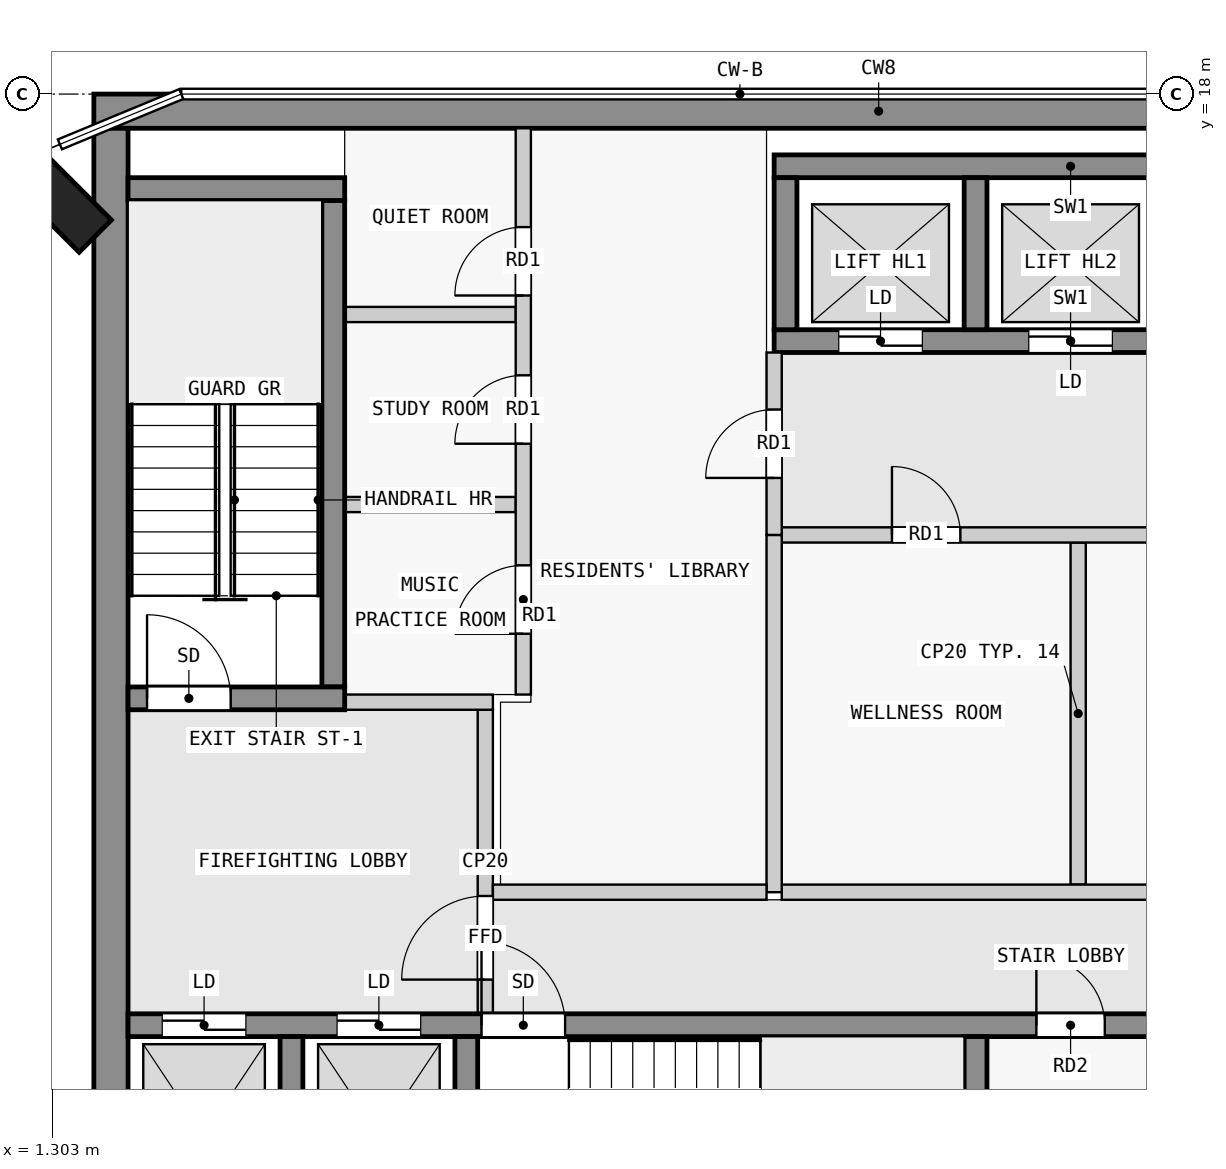
"""IFC4 building model, lengths in metres.
Left out: names, types, materials, properties, quantities, classifications, styles, units other than length and angle.
Written with IfcOpenShell. Run it as: python <this file> out.ifc"""

import sys

from ifc_helpers import new_model, si_unit, direction, frame, frame_2d, origin, origin_2d, place, context, subcontext, project, spatial, rectangle, extrude, element, fill, save


model = new_model("IFC4")
c1 = context("Model", 3, precision=1e-05, world=origin(), true_north=direction((0.0, 1.0)))
c2 = subcontext(c1, "Body", "Model", "MODEL_VIEW")
j1 = project(units=[si_unit("LENGTHUNIT", "METRE"), si_unit("PLANEANGLEUNIT", "RADIAN")], contexts=[c1])
p1 = place(None, origin())
s1 = spatial("IfcSite", under=j1, at=p1, CompositionType="ELEMENT")
p2 = place(p1, origin())
s2 = spatial("IfcBuilding", under=s1, at=p2, CompositionType="ELEMENT")
p3 = place(p2, frame((0.0, 0.0, 259.9)))
s3 = spatial("IfcBuildingStorey", under=s2, at=p3, CompositionType="ELEMENT", Elevation=259.9)
p4 = place(p3, frame((1.374, 16.626, 0.0), z_axis=(0.0, 0.0, 1.0), x_axis=(0.707106781187, 0.707106781187, 0.0)))
e1 = element("IfcColumn", 1, at=p4, inside=s3, PredefinedType="COLUMN", context=c2, shape_type="SweptSolid", body=[
    extrude(rectangle(XDim=0.6, YDim=1.4, at=origin_2d()), origin(), (0.0, 0.0, 1.0), 3.5),
])
p5 = place(p3, frame((1.85, 17.775, 0.0), z_axis=(0.0, 0.0, 1.0), x_axis=(1.0, 0.0, 0.0)))
e2 = element("IfcWall", 2, at=p5, inside=s3, PredefinedType="SHEAR", context=c2, shape_type="SweptSolid", body=[
    extrude(rectangle(XDim=20.65, YDim=0.45, at=frame_2d((10.325, 0.0))), origin(), (0.0, 0.0, 1.0), 3.25),
])
p6 = place(p3, frame((2.075, 2.5, 0.0), z_axis=(0.0, 0.0, 1.0), x_axis=(0.0, 1.0, 0.0)))
e3 = element("IfcWall", 3, at=p6, inside=s3, PredefinedType="SHEAR", context=c2, shape_type="SweptSolid", body=[
    extrude(rectangle(XDim=15.05, YDim=0.45, at=frame_2d((7.525, 0.0))), origin(), (0.0, 0.0, 1.0), 3.25),
])
for number, where, z_axis, x_axis in (
    (4, (4.45, 2.8, 0.0), (0.0, 0.0, 1.0), (0.0, 1.0, 0.0)),
    (5, (6.75, 2.8, 0.0), (0.0, 0.0, 1.0), (0.0, 1.0, 0.0)),
    (6, (13.45, 2.8, 0.0), (0.0, 0.0, 1.0), (0.0, 1.0, 0.0)),
):
    element("IfcWall", number, at=place(p3, frame(where, z_axis=z_axis, x_axis=x_axis)), inside=s3, PredefinedType="SHEAR", context=c2, shape_type="SweptSolid", body=[
        extrude(rectangle(XDim=2.8, YDim=0.3, at=frame_2d((1.4, 0.0))), origin(), (0.0, 0.0, 1.0), 3.25),
    ])
p7 = place(p3, frame((2.3, 5.75, 0.0), z_axis=(0.0, 0.0, 1.0), x_axis=(1.0, 0.0, 0.0)))
e7 = element("IfcWall", 7, at=p7, inside=s3, PredefinedType="SHEAR", context=c2, shape_type="SweptSolid", body=[
    extrude(rectangle(XDim=18.8, YDim=0.3, at=frame_2d((9.4, 0.0))), origin(), (0.0, 0.0, 1.0), 3.25),
])
p8 = place(p7, frame((4.65, 0.0, 0.0)))
e8 = element("IfcOpeningElement", 8, at=p8, cuts=e7, PredefinedType="OPENING", context=c2, shape_type="SweptSolid", body=[
    extrude(rectangle(XDim=1.1, YDim=2.1, at=frame_2d((0.55, 1.05))), frame((0.0, 0.16, 0.0), z_axis=(0.0, -1.0, 0.0), x_axis=(1.0, 0.0, 0.0)), (0.0, 0.0, 1.0), 0.32),
])
p9 = place(p7, frame((0.45, 0.0, 0.0)))
e9 = element("IfcOpeningElement", 9, at=p9, cuts=e7, PredefinedType="OPENING", context=c2, shape_type="SweptSolid", body=[
    extrude(rectangle(XDim=1.1, YDim=2.1, at=frame_2d((0.55, 1.05))), frame((0.0, 0.16, 0.0), z_axis=(0.0, -1.0, 0.0), x_axis=(1.0, 0.0, 0.0)), (0.0, 0.0, 1.0), 0.32),
])
p10 = place(p7, frame((2.75, 0.0, 0.0)))
e10 = element("IfcOpeningElement", 10, at=p10, cuts=e7, PredefinedType="OPENING", context=c2, shape_type="SweptSolid", body=[
    extrude(rectangle(XDim=1.1, YDim=2.1, at=frame_2d((0.55, 1.05))), frame((0.0, 0.16, 0.0), z_axis=(0.0, -1.0, 0.0), x_axis=(1.0, 0.0, 0.0)), (0.0, 0.0, 1.0), 0.32),
])
p11 = place(p7, frame((11.95, 0.0, 0.0)))
e11 = element("IfcOpeningElement", 11, at=p11, cuts=e7, PredefinedType="OPENING", context=c2, shape_type="SweptSolid", body=[
    extrude(rectangle(XDim=0.9, YDim=2.1, at=frame_2d((0.45, 1.05))), frame((0.0, 0.16, 0.0), z_axis=(0.0, -1.0, 0.0), x_axis=(1.0, 0.0, 0.0)), (0.0, 0.0, 1.0), 0.32),
])
p12 = place(p7, frame((15.7, 0.0, 0.0)))
e12 = element("IfcOpeningElement", 12, at=p12, cuts=e7, PredefinedType="OPENING", context=c2, shape_type="SweptSolid", body=[
    extrude(rectangle(XDim=0.9, YDim=2.1, at=frame_2d((0.45, 1.05))), frame((0.0, 0.16, 0.0), z_axis=(0.0, -1.0, 0.0), x_axis=(1.0, 0.0, 0.0)), (0.0, 0.0, 1.0), 0.32),
])
p13 = place(p3, frame((2.3, 10.05, 0.0), z_axis=(0.0, 0.0, 1.0), x_axis=(1.0, 0.0, 0.0)))
e13 = element("IfcWall", 13, at=p13, inside=s3, PredefinedType="SHEAR", context=c2, shape_type="SweptSolid", body=[
    extrude(rectangle(XDim=2.85, YDim=0.3, at=frame_2d((1.425, 0.0))), origin(), (0.0, 0.0, 1.0), 3.25),
])
p14 = place(p13, frame((0.25, 0.0, 0.0)))
e14 = element("IfcOpeningElement", 14, at=p14, cuts=e13, PredefinedType="OPENING", context=c2, shape_type="SweptSolid", body=[
    extrude(rectangle(XDim=1.1, YDim=2.1, at=frame_2d((0.55, 1.05))), frame((0.0, 0.16, 0.0), z_axis=(0.0, -1.0, 0.0), x_axis=(1.0, 0.0, 0.0)), (0.0, 0.0, 1.0), 0.32),
])
p15 = place(p3, frame((5.0, 10.2, 0.0), z_axis=(0.0, 0.0, 1.0), x_axis=(0.0, 1.0, 0.0)))
e15 = element("IfcWall", 15, at=p15, inside=s3, PredefinedType="SHEAR", context=c2, shape_type="SweptSolid", body=[
    extrude(rectangle(XDim=6.4, YDim=0.3, at=frame_2d((3.2, 0.0))), origin(), (0.0, 0.0, 1.0), 3.25),
])
p16 = place(p3, frame((2.3, 16.75, 0.0), z_axis=(0.0, 0.0, 1.0), x_axis=(1.0, 0.0, 0.0)))
e16 = element("IfcWall", 16, at=p16, inside=s3, PredefinedType="SHEAR", context=c2, shape_type="SweptSolid", body=[
    extrude(rectangle(XDim=2.85, YDim=0.3, at=frame_2d((1.425, 0.0))), origin(), (0.0, 0.0, 1.0), 3.25),
])
p17 = place(p3, frame((10.8, 17.05, 0.0), z_axis=(0.0, 0.0, 1.0), x_axis=(1.0, 0.0, 0.0)))
e17 = element("IfcWall", 17, at=p17, inside=s3, PredefinedType="SHEAR", context=c2, shape_type="SweptSolid", body=[
    extrude(rectangle(XDim=7.8, YDim=0.3, at=frame_2d((3.9, 0.0))), origin(), (0.0, 0.0, 1.0), 3.25),
])
p18 = place(p3, frame((10.8, 14.75, 0.0), z_axis=(0.0, 0.0, 1.0), x_axis=(1.0, 0.0, 0.0)))
e18 = element("IfcWall", 18, at=p18, inside=s3, PredefinedType="SHEAR", context=c2, shape_type="SweptSolid", body=[
    extrude(rectangle(XDim=7.8, YDim=0.3, at=frame_2d((3.9, 0.0))), origin(), (0.0, 0.0, 1.0), 3.25),
])
p19 = place(p18, frame((0.85, 0.0, 0.0)))
e19 = element("IfcOpeningElement", 19, at=p19, cuts=e18, PredefinedType="OPENING", context=c2, shape_type="SweptSolid", body=[
    extrude(rectangle(XDim=1.1, YDim=2.1, at=frame_2d((0.55, 1.05))), frame((0.0, 0.16, 0.0), z_axis=(0.0, -1.0, 0.0), x_axis=(1.0, 0.0, 0.0)), (0.0, 0.0, 1.0), 0.32),
])
p20 = place(p18, frame((3.35, 0.0, 0.0)))
e20 = element("IfcOpeningElement", 20, at=p20, cuts=e18, PredefinedType="OPENING", context=c2, shape_type="SweptSolid", body=[
    extrude(rectangle(XDim=1.1, YDim=2.1, at=frame_2d((0.55, 1.05))), frame((0.0, 0.16, 0.0), z_axis=(0.0, -1.0, 0.0), x_axis=(1.0, 0.0, 0.0)), (0.0, 0.0, 1.0), 0.32),
])
p21 = place(p18, frame((5.85, 0.0, 0.0)))
e21 = element("IfcOpeningElement", 21, at=p21, cuts=e18, PredefinedType="OPENING", context=c2, shape_type="SweptSolid", body=[
    extrude(rectangle(XDim=1.1, YDim=2.1, at=frame_2d((0.55, 1.05))), frame((0.0, 0.16, 0.0), z_axis=(0.0, -1.0, 0.0), x_axis=(1.0, 0.0, 0.0)), (0.0, 0.0, 1.0), 0.32),
])
for number, where, z_axis, x_axis in (
    (22, (10.95, 14.9, 0.0), (0.0, 0.0, 1.0), (0.0, 1.0, 0.0)),
    (23, (13.45, 14.9, 0.0), (0.0, 0.0, 1.0), (0.0, 1.0, 0.0)),
):
    element("IfcWall", number, at=place(p3, frame(where, z_axis=z_axis, x_axis=x_axis)), inside=s3, PredefinedType="SHEAR", context=c2, shape_type="SweptSolid", body=[
        extrude(rectangle(XDim=2.0, YDim=0.3, at=frame_2d((1.0, 0.0))), origin(), (0.0, 0.0, 1.0), 3.25),
    ])
p22 = place(p3, frame((7.0, 5.9, 0.0), z_axis=(0.0, 0.0, 1.0), x_axis=(0.0, 1.0, 0.0)))
e24 = element("IfcWall", 24, at=p22, inside=s3, PredefinedType="PARTITIONING", context=c2, shape_type="SweptSolid", body=[
    extrude(rectangle(XDim=4.0, YDim=0.2, at=frame_2d((2.0, 0.0))), origin(), (0.0, 0.0, 1.0), 3.25),
])
p23 = place(p22, frame((0.45, 0.0, 0.0)))
e25 = element("IfcOpeningElement", 25, at=p23, cuts=e24, PredefinedType="OPENING", context=c2, shape_type="SweptSolid", body=[
    extrude(rectangle(XDim=1.1, YDim=2.1, at=frame_2d((0.55, 1.05))), frame((0.0, 0.11, 0.0), z_axis=(0.0, -1.0, 0.0), x_axis=(1.0, 0.0, 0.0)), (0.0, 0.0, 1.0), 0.22),
])
p24 = place(p3, frame((5.15, 10.0, 0.0), z_axis=(0.0, 0.0, 1.0), x_axis=(1.0, 0.0, 0.0)))
e26 = element("IfcWall", 26, at=p24, inside=s3, PredefinedType="PARTITIONING", context=c2, shape_type="SweptSolid", body=[
    extrude(rectangle(XDim=1.95, YDim=0.2, at=frame_2d((0.975, 0.0))), origin(), (0.0, 0.0, 1.0), 3.25),
])
p25 = place(p3, frame((7.1, 7.5, 0.0), z_axis=(0.0, 0.0, 1.0), x_axis=(1.0, 0.0, 0.0)))
e27 = element("IfcWall", 27, at=p25, inside=s3, PredefinedType="PARTITIONING", context=c2, shape_type="SweptSolid", body=[
    extrude(rectangle(XDim=3.6, YDim=0.2, at=frame_2d((1.8, 0.0))), origin(), (0.0, 0.0, 1.0), 3.25),
])
p26 = place(p3, frame((10.8, 12.2, 0.0), z_axis=(0.0, 0.0, 1.0), x_axis=(0.0, 1.0, 0.0)))
e28 = element("IfcWall", 28, at=p26, inside=s3, PredefinedType="PARTITIONING", context=c2, shape_type="SweptSolid", body=[
    extrude(rectangle(XDim=2.4, YDim=0.2, at=frame_2d((1.2, 0.0))), origin(), (0.0, 0.0, 1.0), 3.25),
])
p27 = place(p26, frame((0.75, 0.0, 0.0)))
e29 = element("IfcOpeningElement", 29, at=p27, cuts=e28, PredefinedType="OPENING", context=c2, shape_type="SweptSolid", body=[
    extrude(rectangle(XDim=0.9, YDim=2.1, at=frame_2d((0.45, 1.05))), frame((0.0, 0.11, 0.0), z_axis=(0.0, -1.0, 0.0), x_axis=(1.0, 0.0, 0.0)), (0.0, 0.0, 1.0), 0.22),
])
p28 = place(p3, frame((10.8, 7.5, 0.0), z_axis=(0.0, 0.0, 1.0), x_axis=(0.0, 1.0, 0.0)))
e30 = element("IfcWall", 30, at=p28, inside=s3, PredefinedType="PARTITIONING", context=c2, shape_type="SweptSolid", body=[
    extrude(rectangle(XDim=4.7, YDim=0.2, at=frame_2d((2.35, 0.0))), origin(), (0.0, 0.0, 1.0), 3.25),
])
p29 = place(p3, frame((10.9, 7.5, 0.0), z_axis=(0.0, 0.0, 1.0), x_axis=(1.0, 0.0, 0.0)))
e31 = element("IfcWall", 31, at=p29, inside=s3, PredefinedType="PARTITIONING", context=c2, shape_type="SweptSolid", body=[
    extrude(rectangle(XDim=8.65, YDim=0.2, at=frame_2d((4.325, 0.0))), origin(), (0.0, 0.0, 1.0), 3.25),
])
p30 = place(p3, frame((10.9, 12.2, 0.0), z_axis=(0.0, 0.0, 1.0), x_axis=(1.0, 0.0, 0.0)))
e32 = element("IfcWall", 32, at=p30, inside=s3, PredefinedType="PARTITIONING", context=c2, shape_type="SweptSolid", body=[
    extrude(rectangle(XDim=8.65, YDim=0.2, at=frame_2d((4.325, 0.0))), origin(), (0.0, 0.0, 1.0), 3.25),
])
p31 = place(p30, frame((1.45, 0.0, 0.0)))
e33 = element("IfcOpeningElement", 33, at=p31, cuts=e32, PredefinedType="OPENING", context=c2, shape_type="SweptSolid", body=[
    extrude(rectangle(XDim=0.9, YDim=2.1, at=frame_2d((0.45, 1.05))), frame((0.0, 0.11, 0.0), z_axis=(0.0, -1.0, 0.0), x_axis=(1.0, 0.0, 0.0)), (0.0, 0.0, 1.0), 0.22),
])
p32 = place(p30, frame((5.875, 0.0, 0.0)))
e34 = element("IfcOpeningElement", 34, at=p32, cuts=e32, PredefinedType="OPENING", context=c2, shape_type="SweptSolid", body=[
    extrude(rectangle(XDim=0.9, YDim=2.1, at=frame_2d((0.45, 1.05))), frame((0.0, 0.11, 0.0), z_axis=(0.0, -1.0, 0.0), x_axis=(1.0, 0.0, 0.0)), (0.0, 0.0, 1.0), 0.22),
])
p33 = place(p3, frame((14.8, 7.6, 0.0), z_axis=(0.0, 0.0, 1.0), x_axis=(0.0, 1.0, 0.0)))
e35 = element("IfcWall", 35, at=p33, inside=s3, PredefinedType="PARTITIONING", context=c2, shape_type="SweptSolid", body=[
    extrude(rectangle(XDim=4.5, YDim=0.2, at=frame_2d((2.25, 0.0))), origin(), (0.0, 0.0, 1.0), 3.25),
])
p34 = place(p3, frame((7.5, 10.1, 0.0), z_axis=(0.0, 0.0, 1.0), x_axis=(0.0, 1.0, 0.0)))
e36 = element("IfcWall", 36, at=p34, inside=s3, PredefinedType="PARTITIONING", context=c2, shape_type="SweptSolid", body=[
    extrude(rectangle(XDim=7.45, YDim=0.2, at=frame_2d((3.725, 0.0))), origin(), (0.0, 0.0, 1.0), 3.25),
])
p35 = place(p34, frame((0.8, 0.0, 0.0)))
e37 = element("IfcOpeningElement", 37, at=p35, cuts=e36, PredefinedType="OPENING", context=c2, shape_type="SweptSolid", body=[
    extrude(rectangle(XDim=0.9, YDim=2.1, at=frame_2d((0.45, 1.05))), frame((0.0, 0.11, 0.0), z_axis=(0.0, -1.0, 0.0), x_axis=(1.0, 0.0, 0.0)), (0.0, 0.0, 1.0), 0.22),
])
p36 = place(p34, frame((3.3, 0.0, 0.0)))
e38 = element("IfcOpeningElement", 38, at=p36, cuts=e36, PredefinedType="OPENING", context=c2, shape_type="SweptSolid", body=[
    extrude(rectangle(XDim=0.9, YDim=2.1, at=frame_2d((0.45, 1.05))), frame((0.0, 0.11, 0.0), z_axis=(0.0, -1.0, 0.0), x_axis=(1.0, 0.0, 0.0)), (0.0, 0.0, 1.0), 0.22),
])
p37 = place(p34, frame((5.25, 0.0, 0.0)))
e39 = element("IfcOpeningElement", 39, at=p37, cuts=e36, PredefinedType="OPENING", context=c2, shape_type="SweptSolid", body=[
    extrude(rectangle(XDim=0.9, YDim=2.1, at=frame_2d((0.45, 1.05))), frame((0.0, 0.11, 0.0), z_axis=(0.0, -1.0, 0.0), x_axis=(1.0, 0.0, 0.0)), (0.0, 0.0, 1.0), 0.22),
])
for number, where, z_axis, x_axis in (
    (40, (5.15, 12.6, 0.0), (0.0, 0.0, 1.0), (1.0, 0.0, 0.0)),
    (41, (5.15, 15.1, 0.0), (0.0, 0.0, 1.0), (1.0, 0.0, 0.0)),
):
    element("IfcWall", number, at=place(p3, frame(where, z_axis=z_axis, x_axis=x_axis)), inside=s3, PredefinedType="PARTITIONING", context=c2, shape_type="SweptSolid", body=[
        extrude(rectangle(XDim=2.25, YDim=0.2, at=frame_2d((1.125, 0.0))), origin(), (0.0, 0.0, 1.0), 3.25),
    ])
p38 = place(p23, origin())
e42 = element("IfcDoor", 42, at=p38, inside=s3, OperationType="SINGLE_SWING_LEFT", PredefinedType="DOOR", context=c2, shape_type="SweptSolid", body=[
    extrude(rectangle(XDim=1.1, YDim=2.1, at=frame_2d((0.55, 1.05))), frame((0.0, 0.025, 0.0), z_axis=(0.0, -1.0, 0.0), x_axis=(1.0, 0.0, 0.0)), (0.0, 0.0, 1.0), 0.05),
])
fill(e25, e42)
p39 = place(p14, origin())
e43 = element("IfcDoor", 43, at=p39, inside=s3, OperationType="SINGLE_SWING_RIGHT", PredefinedType="DOOR", context=c2, shape_type="SweptSolid", body=[
    extrude(rectangle(XDim=1.1, YDim=2.1, at=frame_2d((0.55, 1.05))), frame((0.0, 0.025, 0.0), z_axis=(0.0, -1.0, 0.0), x_axis=(1.0, 0.0, 0.0)), (0.0, 0.0, 1.0), 0.05),
])
fill(e14, e43)
p40 = place(p27, origin())
e44 = element("IfcDoor", 44, at=p40, inside=s3, OperationType="SINGLE_SWING_LEFT", PredefinedType="DOOR", context=c2, shape_type="SweptSolid", body=[
    extrude(rectangle(XDim=0.9, YDim=2.1, at=frame_2d((0.45, 1.05))), frame((0.0, 0.025, 0.0), z_axis=(0.0, -1.0, 0.0), x_axis=(1.0, 0.0, 0.0)), (0.0, 0.0, 1.0), 0.05),
])
fill(e29, e44)
p41 = place(p31, origin())
e45 = element("IfcDoor", 45, at=p41, inside=s3, OperationType="SINGLE_SWING_LEFT", PredefinedType="DOOR", context=c2, shape_type="SweptSolid", body=[
    extrude(rectangle(XDim=0.9, YDim=2.1, at=frame_2d((0.45, 1.05))), frame((0.0, 0.025, 0.0), z_axis=(0.0, -1.0, 0.0), x_axis=(1.0, 0.0, 0.0)), (0.0, 0.0, 1.0), 0.05),
])
fill(e33, e45)
p42 = place(p8, origin())
e46 = element("IfcDoor", 46, at=p42, inside=s3, OperationType="SINGLE_SWING_LEFT", PredefinedType="DOOR", context=c2, shape_type="SweptSolid", body=[
    extrude(rectangle(XDim=1.1, YDim=2.1, at=frame_2d((0.55, 1.05))), frame((0.0, 0.025, 0.0), z_axis=(0.0, -1.0, 0.0), x_axis=(1.0, 0.0, 0.0)), (0.0, 0.0, 1.0), 0.05),
])
fill(e8, e46)
p43 = place(p9, origin())
e47 = element("IfcDoor", 47, at=p43, inside=s3, OperationType="DOUBLE_DOOR_SLIDING", PredefinedType="DOOR", context=c2, shape_type="SweptSolid", body=[
    extrude(rectangle(XDim=1.1, YDim=2.1, at=frame_2d((0.55, 1.05))), frame((0.0, 0.025, 0.0), z_axis=(0.0, -1.0, 0.0), x_axis=(1.0, 0.0, 0.0)), (0.0, 0.0, 1.0), 0.05),
])
fill(e9, e47)
p44 = place(p10, origin())
e48 = element("IfcDoor", 48, at=p44, inside=s3, OperationType="DOUBLE_DOOR_SLIDING", PredefinedType="DOOR", context=c2, shape_type="SweptSolid", body=[
    extrude(rectangle(XDim=1.1, YDim=2.1, at=frame_2d((0.55, 1.05))), frame((0.0, 0.025, 0.0), z_axis=(0.0, -1.0, 0.0), x_axis=(1.0, 0.0, 0.0)), (0.0, 0.0, 1.0), 0.05),
])
fill(e10, e48)
p45 = place(p19, origin())
e49 = element("IfcDoor", 49, at=p45, inside=s3, OperationType="DOUBLE_DOOR_SLIDING", PredefinedType="DOOR", context=c2, shape_type="SweptSolid", body=[
    extrude(rectangle(XDim=1.1, YDim=2.1, at=frame_2d((0.55, 1.05))), frame((0.0, 0.025, 0.0), z_axis=(0.0, -1.0, 0.0), x_axis=(1.0, 0.0, 0.0)), (0.0, 0.0, 1.0), 0.05),
])
fill(e19, e49)
p46 = place(p20, origin())
e50 = element("IfcDoor", 50, at=p46, inside=s3, OperationType="DOUBLE_DOOR_SLIDING", PredefinedType="DOOR", context=c2, shape_type="SweptSolid", body=[
    extrude(rectangle(XDim=1.1, YDim=2.1, at=frame_2d((0.55, 1.05))), frame((0.0, 0.025, 0.0), z_axis=(0.0, -1.0, 0.0), x_axis=(1.0, 0.0, 0.0)), (0.0, 0.0, 1.0), 0.05),
])
fill(e20, e50)
p47 = place(p35, origin())
e51 = element("IfcDoor", 51, at=p47, inside=s3, OperationType="SINGLE_SWING_RIGHT", PredefinedType="DOOR", context=c2, shape_type="SweptSolid", body=[
    extrude(rectangle(XDim=0.9, YDim=2.1, at=frame_2d((0.45, 1.05))), frame((0.0, 0.025, 0.0), z_axis=(0.0, -1.0, 0.0), x_axis=(1.0, 0.0, 0.0)), (0.0, 0.0, 1.0), 0.05),
])
fill(e37, e51)
p48 = place(p36, origin())
e52 = element("IfcDoor", 52, at=p48, inside=s3, OperationType="SINGLE_SWING_RIGHT", PredefinedType="DOOR", context=c2, shape_type="SweptSolid", body=[
    extrude(rectangle(XDim=0.9, YDim=2.1, at=frame_2d((0.45, 1.05))), frame((0.0, 0.025, 0.0), z_axis=(0.0, -1.0, 0.0), x_axis=(1.0, 0.0, 0.0)), (0.0, 0.0, 1.0), 0.05),
])
fill(e38, e52)
p49 = place(p37, origin())
e53 = element("IfcDoor", 53, at=p49, inside=s3, OperationType="SINGLE_SWING_RIGHT", PredefinedType="DOOR", context=c2, shape_type="SweptSolid", body=[
    extrude(rectangle(XDim=0.9, YDim=2.1, at=frame_2d((0.45, 1.05))), frame((0.0, 0.025, 0.0), z_axis=(0.0, -1.0, 0.0), x_axis=(1.0, 0.0, 0.0)), (0.0, 0.0, 1.0), 0.05),
])
fill(e39, e53)
p50 = place(p11, origin())
e54 = element("IfcDoor", 54, at=p50, inside=s3, OperationType="SINGLE_SWING_LEFT", PredefinedType="DOOR", context=c2, shape_type="SweptSolid", body=[
    extrude(rectangle(XDim=0.9, YDim=2.1, at=frame_2d((0.45, 1.05))), frame((0.0, 0.025, 0.0), z_axis=(0.0, -1.0, 0.0), x_axis=(1.0, 0.0, 0.0)), (0.0, 0.0, 1.0), 0.05),
])
fill(e11, e54)
save(model, sys.argv[1])
